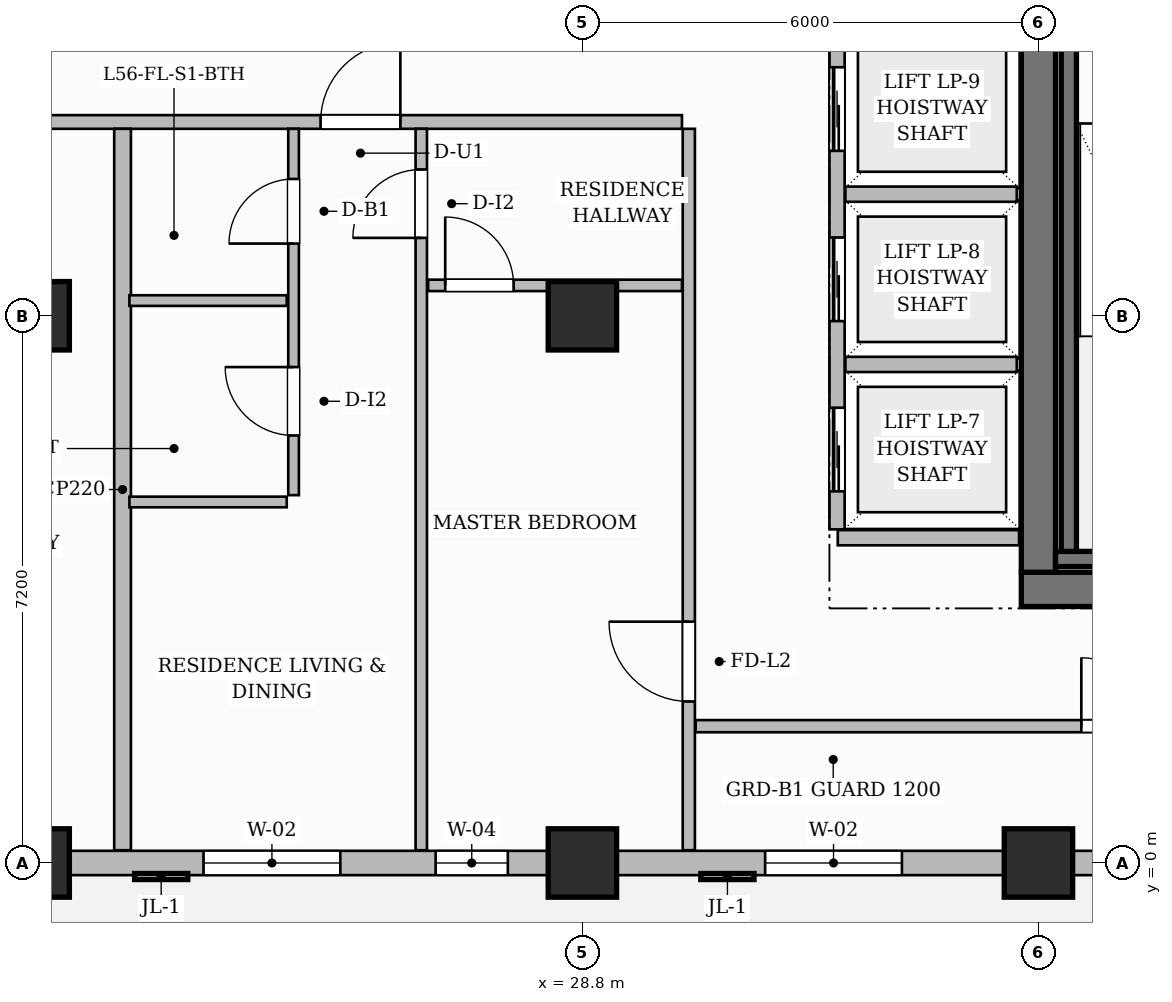
"""IFC4 building model, lengths in metres.
Left out: names, types, materials, properties, quantities, classifications, styles, units other than length and angle.
Written with IfcOpenShell. Run it as: python <this file> out.ifc"""

import sys

from ifc_helpers import new_model, si_unit, direction, frame, frame_2d, origin, origin_2d, place, context, subcontext, project, spatial, rectangle, extrude, source, transform, mapped, element, fill, save


model = new_model("IFC4")
c1 = context("Model", 3, precision=1e-05, world=origin(), true_north=direction((0.0, 1.0)))
c2 = subcontext(c1, "Body", "Model", "MODEL_VIEW")
j1 = project(units=[si_unit("LENGTHUNIT", "METRE"), si_unit("PLANEANGLEUNIT", "RADIAN")], contexts=[c1])
p1 = place(None, origin())
s1 = spatial("IfcSite", under=j1, at=p1, CompositionType="ELEMENT")
p2 = place(p1, origin())
s2 = spatial("IfcBuilding", under=s1, at=p2, CompositionType="ELEMENT")
p3 = place(p2, frame((0.0, 0.0, 225.0)))
s3 = spatial("IfcBuildingStorey", under=s2, at=p3, CompositionType="ELEMENT", Elevation=225.0)
p4 = place(p3, frame((34.575, 3.6, 0.0), z_axis=(0.0, 0.0, 1.0), x_axis=(1.0, 0.0, 0.0)))
e1 = element("IfcWall", 1, at=p4, inside=s3, PredefinedType="SHEAR", context=c2, shape_type="SweptSolid", body=[
    extrude(rectangle(XDim=15.45, YDim=0.45, at=frame_2d((7.725, 0.0))), origin(), (0.0, 0.0, 1.0), 3.85),
])
p5 = place(p4, frame((4.695, 0.0, 0.0)))
e2 = element("IfcOpeningElement", 2, at=p5, cuts=e1, PredefinedType="OPENING", context=c2, shape_type="SweptSolid", body=[
    extrude(rectangle(XDim=0.9, YDim=2.1, at=frame_2d((0.45, 1.05))), frame((0.0, 0.235, 0.0), z_axis=(0.0, -1.0, 0.0), x_axis=(1.0, 0.0, 0.0)), (0.0, 0.0, 1.0), 0.47),
])
p6 = place(p4, frame((7.075, 0.0, 0.0)))
e3 = element("IfcOpeningElement", 3, at=p6, cuts=e1, PredefinedType="OPENING", context=c2, shape_type="SweptSolid", body=[
    extrude(rectangle(XDim=0.9, YDim=2.1, at=frame_2d((0.45, 1.05))), frame((0.0, 0.235, 0.0), z_axis=(0.0, -1.0, 0.0), x_axis=(1.0, 0.0, 0.0)), (0.0, 0.0, 1.0), 0.47),
])
p7 = place(p3, frame((34.8, 3.825, 0.0), z_axis=(0.0, 0.0, 1.0), x_axis=(0.0, 1.0, 0.0)))
e4 = element("IfcWall", 4, at=p7, inside=s3, PredefinedType="SHEAR", context=c2, shape_type="SweptSolid", body=[
    extrude(rectangle(XDim=10.35, YDim=0.45, at=frame_2d((5.175, 0.0))), origin(), (0.0, 0.0, 1.0), 3.85),
])
m1 = source(origin(), c2, "Body", "SweptSolid", [
    extrude(rectangle(XDim=0.9, YDim=0.9, at=origin_2d()), origin(), (0.0, 0.0, 1.0), 3.85),
])
for number, where, z_axis, x_axis in (
    (5, (21.6, 0.0, 0.0), (0.0, 0.0, 1.0), (1.0, 0.0, 0.0)),
    (6, (21.6, 7.2, 0.0), (0.0, 0.0, 1.0), (1.0, 0.0, 0.0)),
    (7, (28.8, 0.0, 0.0), (0.0, 0.0, 1.0), (1.0, 0.0, 0.0)),
    (8, (28.8, 7.2, 0.0), (0.0, 0.0, 1.0), (1.0, 0.0, 0.0)),
    (9, (34.8, 0.0, 0.0), (0.0, 0.0, 1.0), (1.0, 0.0, 0.0)),
):
    element("IfcColumn", number, at=place(p3, frame(where, z_axis=z_axis, x_axis=x_axis)), inside=s3, PredefinedType="COLUMN", context=c2, shape_type="MappedRepresentation", body=[
        mapped(m1, transform((0.0, 0.0, 0.0), scale=1.0)),
    ])
p8 = place(p3, frame((35.025, 4.0, 0.0), z_axis=(0.0, 0.0, 1.0), x_axis=(1.0, 0.0, 0.0)))
e10 = element("IfcWall", 10, at=p8, inside=s3, PredefinedType="SHEAR", context=c2, shape_type="SweptSolid", body=[
    extrude(rectangle(XDim=3.215, YDim=0.2, at=frame_2d((1.607, 0.0))), origin(), (0.0, 0.0, 1.0), 3.85),
])
p9 = place(p3, frame((35.2, 4.1, 0.0), z_axis=(0.0, 0.0, 1.0), x_axis=(0.0, 1.0, 0.0)))
e11 = element("IfcWall", 11, at=p9, inside=s3, PredefinedType="SHEAR", context=c2, shape_type="SweptSolid", body=[
    extrude(rectangle(XDim=6.95, YDim=0.2, at=frame_2d((3.475, 0.0))), origin(), (0.0, 0.0, 1.0), 3.85),
])
p10 = place(p3, frame((32.16, 4.28, 0.0), z_axis=(0.0, 0.0, 1.0), x_axis=(1.0, 0.0, 0.0)))
e12 = element("IfcWall", 12, at=p10, inside=s3, PredefinedType="PARTITIONING", context=c2, shape_type="SweptSolid", body=[
    extrude(rectangle(XDim=2.385, YDim=0.2, at=frame_2d((1.192, 0.0))), origin(), (0.0, 0.0, 1.0), 3.6),
])
p11 = place(p3, frame((32.15, 4.39, 0.0), z_axis=(0.0, 0.0, 1.0), x_axis=(0.0, 1.0, 0.0)))
e13 = element("IfcWall", 13, at=p11, inside=s3, PredefinedType="PARTITIONING", context=c2, shape_type="SweptSolid", body=[
    extrude(rectangle(XDim=8.82, YDim=0.2, at=frame_2d((4.41, 0.0))), origin(), (0.0, 0.0, 1.0), 3.6),
])
p12 = place(p11, frame((0.5, 0.0, 0.0)))
e14 = element("IfcOpeningElement", 14, at=p12, cuts=e13, PredefinedType="OPENING", context=c2, shape_type="SweptSolid", body=[
    extrude(rectangle(XDim=1.1, YDim=2.2, at=frame_2d((0.55, 1.1))), frame((0.0, 0.11, 0.0), z_axis=(0.0, -1.0, 0.0), x_axis=(1.0, 0.0, 0.0)), (0.0, 0.0, 1.0), 0.22),
])
p13 = place(p11, frame((2.74, 0.0, 0.0)))
e15 = element("IfcOpeningElement", 15, at=p13, cuts=e13, PredefinedType="OPENING", context=c2, shape_type="SweptSolid", body=[
    extrude(rectangle(XDim=1.1, YDim=2.2, at=frame_2d((0.55, 1.1))), frame((0.0, 0.11, 0.0), z_axis=(0.0, -1.0, 0.0), x_axis=(1.0, 0.0, 0.0)), (0.0, 0.0, 1.0), 0.22),
])
p14 = place(p11, frame((4.98, 0.0, 0.0)))
e16 = element("IfcOpeningElement", 16, at=p14, cuts=e13, PredefinedType="OPENING", context=c2, shape_type="SweptSolid", body=[
    extrude(rectangle(XDim=1.1, YDim=2.2, at=frame_2d((0.55, 1.1))), frame((0.0, 0.11, 0.0), z_axis=(0.0, -1.0, 0.0), x_axis=(1.0, 0.0, 0.0)), (0.0, 0.0, 1.0), 0.22),
])
p15 = place(p11, frame((7.22, 0.0, 0.0)))
e17 = element("IfcOpeningElement", 17, at=p15, cuts=e13, PredefinedType="OPENING", context=c2, shape_type="SweptSolid", body=[
    extrude(rectangle(XDim=1.1, YDim=2.2, at=frame_2d((0.55, 1.1))), frame((0.0, 0.11, 0.0), z_axis=(0.0, -1.0, 0.0), x_axis=(1.0, 0.0, 0.0)), (0.0, 0.0, 1.0), 0.22),
])
for number, where, z_axis, x_axis in (
    (18, (32.26, 6.56, 0.0), (0.0, 0.0, 1.0), (1.0, 0.0, 0.0)),
    (19, (32.26, 8.8, 0.0), (0.0, 0.0, 1.0), (1.0, 0.0, 0.0)),
):
    element("IfcWall", number, at=place(p3, frame(where, z_axis=z_axis, x_axis=x_axis)), inside=s3, PredefinedType="PARTITIONING", context=c2, shape_type="SweptSolid", body=[
        extrude(rectangle(XDim=2.255, YDim=0.2, at=frame_2d((1.127, 0.0))), origin(), (0.0, 0.0, 1.0), 3.6),
    ])
p16 = place(p3, frame((14.568, 9.75, 0.0), z_axis=(0.0, 0.0, 1.0), x_axis=(1.0, 0.0, 0.0)))
e20 = element("IfcWall", 20, at=p16, inside=s3, PredefinedType="PARTITIONING", context=c2, shape_type="SweptSolid", body=[
    extrude(rectangle(XDim=15.542, YDim=0.18, at=frame_2d((7.771, 0.0))), origin(), (0.0, 0.0, 1.0), 3.6),
])
p17 = place(p16, frame((1.032, 0.0, 0.0)))
e21 = element("IfcOpeningElement", 21, at=p17, cuts=e20, PredefinedType="OPENING", context=c2, shape_type="SweptSolid", body=[
    extrude(rectangle(XDim=1.4, YDim=2.35, at=frame_2d((0.7, 1.175))), frame((0.0, 0.1, 0.0), z_axis=(0.0, -1.0, 0.0), x_axis=(1.0, 0.0, 0.0)), (0.0, 0.0, 1.0), 0.2),
])
p18 = place(p16, frame((5.432, 0.0, 0.0)))
e22 = element("IfcOpeningElement", 22, at=p18, cuts=e20, PredefinedType="OPENING", context=c2, shape_type="SweptSolid", body=[
    extrude(rectangle(XDim=0.95, YDim=2.15, at=frame_2d((0.475, 1.075))), frame((0.0, 0.1, 0.0), z_axis=(0.0, -1.0, 0.0), x_axis=(1.0, 0.0, 0.0)), (0.0, 0.0, 1.0), 0.2),
])
p19 = place(p16, frame((10.787, 0.0, 0.0)))
e23 = element("IfcOpeningElement", 23, at=p19, cuts=e20, PredefinedType="OPENING", context=c2, shape_type="SweptSolid", body=[
    extrude(rectangle(XDim=1.05, YDim=2.25, at=frame_2d((0.525, 1.125))), frame((0.0, 0.1, 0.0), z_axis=(0.0, -1.0, 0.0), x_axis=(1.0, 0.0, 0.0)), (0.0, 0.0, 1.0), 0.2),
])
p20 = place(p3, frame((30.2, 0.168, 0.0), z_axis=(0.0, 0.0, 1.0), x_axis=(0.0, 1.0, 0.0)))
e24 = element("IfcWall", 24, at=p20, inside=s3, PredefinedType="PARTITIONING", context=c2, shape_type="SweptSolid", body=[
    extrude(rectangle(XDim=9.492, YDim=0.16, at=frame_2d((4.746, 0.0))), origin(), (0.0, 0.0, 1.0), 3.6),
])
p21 = place(p20, frame((1.957, 0.0, 0.0)))
e25 = element("IfcOpeningElement", 25, at=p21, cuts=e24, PredefinedType="OPENING", context=c2, shape_type="SweptSolid", body=[
    extrude(rectangle(XDim=1.05, YDim=2.15, at=frame_2d((0.525, 1.075))), frame((0.0, 0.09, 0.0), z_axis=(0.0, -1.0, 0.0), x_axis=(1.0, 0.0, 0.0)), (0.0, 0.0, 1.0), 0.18),
])
p22 = place(p3, frame((30.29, 1.8, 0.0), z_axis=(0.0, 0.0, 1.0), x_axis=(1.0, 0.0, 0.0)))
e26 = element("IfcWall", 26, at=p22, inside=s3, PredefinedType="PARTITIONING", context=c2, shape_type="SweptSolid", body=[
    extrude(rectangle(XDim=19.37, YDim=0.16, at=frame_2d((9.685, 0.0))), origin(), (0.0, 0.0, 1.0), 3.6),
])
p23 = place(p22, frame((5.074, 0.0, 0.0)))
e27 = element("IfcOpeningElement", 27, at=p23, cuts=e26, PredefinedType="OPENING", context=c2, shape_type="SweptSolid", body=[
    extrude(rectangle(XDim=0.9, YDim=2.15, at=frame_2d((0.45, 1.075))), frame((0.0, 0.09, 0.0), z_axis=(0.0, -1.0, 0.0), x_axis=(1.0, 0.0, 0.0)), (0.0, 0.0, 1.0), 0.18),
])
p24 = place(p22, frame((14.06, 0.0, 0.0)))
e28 = element("IfcOpeningElement", 28, at=p24, cuts=e26, PredefinedType="OPENING", context=c2, shape_type="SweptSolid", body=[
    extrude(rectangle(XDim=0.9, YDim=2.15, at=frame_2d((0.45, 1.075))), frame((0.0, 0.09, 0.0), z_axis=(0.0, -1.0, 0.0), x_axis=(1.0, 0.0, 0.0)), (0.0, 0.0, 1.0), 0.18),
])
p25 = place(p3, frame((22.75, 0.168, 0.0), z_axis=(0.0, 0.0, 1.0), x_axis=(0.0, 1.0, 0.0)))
e29 = element("IfcWall", 29, at=p25, inside=s3, PredefinedType="PARTITIONING", context=c2, shape_type="SweptSolid", body=[
    extrude(rectangle(XDim=9.492, YDim=0.22, at=frame_2d((4.746, 0.0))), origin(), (0.0, 0.0, 1.0), 3.6),
])
p26 = place(p3, frame((25.0, 4.84, 0.0), z_axis=(0.0, 0.0, 1.0), x_axis=(0.0, 1.0, 0.0)))
e30 = element("IfcWall", 30, at=p26, inside=s3, PredefinedType="PARTITIONING", context=c2, shape_type="SweptSolid", body=[
    extrude(rectangle(XDim=4.82, YDim=0.14, at=frame_2d((2.41, 0.0))), origin(), (0.0, 0.0, 1.0), 3.315),
])
p27 = place(p26, frame((0.785, 0.0, 0.0)))
e31 = element("IfcOpeningElement", 31, at=p27, cuts=e30, PredefinedType="OPENING", context=c2, shape_type="SweptSolid", body=[
    extrude(rectangle(XDim=0.9, YDim=2.15, at=frame_2d((0.45, 1.075))), frame((0.0, 0.08, 0.0), z_axis=(0.0, -1.0, 0.0), x_axis=(1.0, 0.0, 0.0)), (0.0, 0.0, 1.0), 0.16),
])
p28 = place(p26, frame((3.31, 0.0, 0.0)))
e32 = element("IfcOpeningElement", 32, at=p28, cuts=e30, PredefinedType="OPENING", context=c2, shape_type="SweptSolid", body=[
    extrude(rectangle(XDim=0.85, YDim=2.1, at=frame_2d((0.425, 1.05))), frame((0.0, 0.08, 0.0), z_axis=(0.0, -1.0, 0.0), x_axis=(1.0, 0.0, 0.0)), (0.0, 0.0, 1.0), 0.16),
])
p29 = place(p3, frame((22.84, 7.4, 0.0), z_axis=(0.0, 0.0, 1.0), x_axis=(1.0, 0.0, 0.0)))
e33 = element("IfcWall", 33, at=p29, inside=s3, PredefinedType="PARTITIONING", context=c2, shape_type="SweptSolid", body=[
    extrude(rectangle(XDim=2.07, YDim=0.14, at=frame_2d((1.035, 0.0))), origin(), (0.0, 0.0, 1.0), 3.135),
])
p30 = place(p3, frame((22.84, 4.75, 0.0), z_axis=(0.0, 0.0, 1.0), x_axis=(1.0, 0.0, 0.0)))
e34 = element("IfcWall", 34, at=p30, inside=s3, PredefinedType="PARTITIONING", context=c2, shape_type="SweptSolid", body=[
    extrude(rectangle(XDim=2.07, YDim=0.14, at=frame_2d((1.035, 0.0))), origin(), (0.0, 0.0, 1.0), 3.6),
])
p31 = place(p3, frame((26.68, 0.168, 0.0), z_axis=(0.0, 0.0, 1.0), x_axis=(0.0, 1.0, 0.0)))
e35 = element("IfcWall", 35, at=p31, inside=s3, PredefinedType="PARTITIONING", context=c2, shape_type="SweptSolid", body=[
    extrude(rectangle(XDim=9.492, YDim=0.15, at=frame_2d((4.746, 0.0))), origin(), (0.0, 0.0, 1.0), 3.6),
])
p32 = place(p31, frame((8.057, 0.0, 0.0)))
e36 = element("IfcOpeningElement", 36, at=p32, cuts=e35, PredefinedType="OPENING", context=c2, shape_type="SweptSolid", body=[
    extrude(rectangle(XDim=0.9, YDim=2.15, at=frame_2d((0.45, 1.075))), frame((0.0, 0.085, 0.0), z_axis=(0.0, -1.0, 0.0), x_axis=(1.0, 0.0, 0.0)), (0.0, 0.0, 1.0), 0.17),
])
p33 = place(p3, frame((26.77, 7.6, 0.0), z_axis=(0.0, 0.0, 1.0), x_axis=(1.0, 0.0, 0.0)))
e37 = element("IfcWall", 37, at=p33, inside=s3, PredefinedType="PARTITIONING", context=c2, shape_type="SweptSolid", body=[
    extrude(rectangle(XDim=3.34, YDim=0.15, at=frame_2d((1.67, 0.0))), origin(), (0.0, 0.0, 1.0), 3.6),
])
p34 = place(p33, frame((0.225, 0.0, 0.0)))
e38 = element("IfcOpeningElement", 38, at=p34, cuts=e37, PredefinedType="OPENING", context=c2, shape_type="SweptSolid", body=[
    extrude(rectangle(XDim=0.9, YDim=2.15, at=frame_2d((0.45, 1.075))), frame((0.0, 0.085, 0.0), z_axis=(0.0, -1.0, 0.0), x_axis=(1.0, 0.0, 0.0)), (0.0, 0.0, 1.0), 0.17),
])
p35 = place(p3, frame((14.4, 0.0, 0.0), z_axis=(0.0, 0.0, 1.0), x_axis=(1.0, 0.0, 0.0)))
e39 = element("IfcWall", 39, at=p35, inside=s3, PredefinedType="SOLIDWALL", context=c2, shape_type="SweptSolid", body=[
    extrude(rectangle(XDim=35.4, YDim=0.32, at=frame_2d((17.7, 0.0))), origin(), (0.0, 0.0, 1.0), 3.135),
])
p36 = place(p35, frame((0.85, 0.0, 0.0)))
e40 = element("IfcOpeningElement", 40, at=p36, cuts=e39, PredefinedType="OPENING", context=c2, shape_type="SweptSolid", body=[
    extrude(rectangle(XDim=1.2, YDim=2.2, at=frame_2d((0.6, 1.1))), frame((0.0, 0.17, 0.0), z_axis=(0.0, -1.0, 0.0), x_axis=(1.0, 0.0, 0.0)), (0.0, 0.0, 1.0), 0.34),
])
p37 = place(p35, frame((2.596, 0.0, 0.8)))
e41 = element("IfcOpeningElement", 41, at=p37, cuts=e39, PredefinedType="OPENING", context=c2, shape_type="SweptSolid", body=[
    extrude(rectangle(XDim=0.95, YDim=1.75, at=frame_2d((0.475, 0.875))), frame((0.0, 0.17, 0.0), z_axis=(0.0, -1.0, 0.0), x_axis=(1.0, 0.0, 0.0)), (0.0, 0.0, 1.0), 0.34),
])
p38 = place(p35, frame((4.204, 0.0, 0.8)))
e42 = element("IfcOpeningElement", 42, at=p38, cuts=e39, PredefinedType="OPENING", context=c2, shape_type="SweptSolid", body=[
    extrude(rectangle(XDim=1.8, YDim=1.85, at=frame_2d((0.9, 0.925))), frame((0.0, 0.17, 0.0), z_axis=(0.0, -1.0, 0.0), x_axis=(1.0, 0.0, 0.0)), (0.0, 0.0, 1.0), 0.34),
])
p39 = place(p35, frame((9.415, 0.0, 0.8)))
e43 = element("IfcOpeningElement", 43, at=p39, cuts=e39, PredefinedType="OPENING", context=c2, shape_type="SweptSolid", body=[
    extrude(rectangle(XDim=1.8, YDim=1.85, at=frame_2d((0.9, 0.925))), frame((0.0, 0.17, 0.0), z_axis=(0.0, -1.0, 0.0), x_axis=(1.0, 0.0, 0.0)), (0.0, 0.0, 1.0), 0.34),
])
p40 = place(p35, frame((12.469, 0.0, 0.8)))
e44 = element("IfcOpeningElement", 44, at=p40, cuts=e39, PredefinedType="OPENING", context=c2, shape_type="SweptSolid", body=[
    extrude(rectangle(XDim=0.95, YDim=1.75, at=frame_2d((0.475, 0.875))), frame((0.0, 0.17, 0.0), z_axis=(0.0, -1.0, 0.0), x_axis=(1.0, 0.0, 0.0)), (0.0, 0.0, 1.0), 0.34),
])
p41 = place(p35, frame((16.804, 0.0, 0.8)))
e45 = element("IfcOpeningElement", 45, at=p41, cuts=e39, PredefinedType="OPENING", context=c2, shape_type="SweptSolid", body=[
    extrude(rectangle(XDim=1.8, YDim=1.85, at=frame_2d((0.9, 0.925))), frame((0.0, 0.17, 0.0), z_axis=(0.0, -1.0, 0.0), x_axis=(1.0, 0.0, 0.0)), (0.0, 0.0, 1.0), 0.34),
])
p42 = place(p35, frame((22.396, 0.0, 0.8)))
e46 = element("IfcOpeningElement", 46, at=p42, cuts=e39, PredefinedType="OPENING", context=c2, shape_type="SweptSolid", body=[
    extrude(rectangle(XDim=1.8, YDim=1.85, at=frame_2d((0.9, 0.925))), frame((0.0, 0.17, 0.0), z_axis=(0.0, -1.0, 0.0), x_axis=(1.0, 0.0, 0.0)), (0.0, 0.0, 1.0), 0.34),
])
p43 = place(p35, frame((25.629, 0.0, 0.8)))
e47 = element("IfcOpeningElement", 47, at=p43, cuts=e39, PredefinedType="OPENING", context=c2, shape_type="SweptSolid", body=[
    extrude(rectangle(XDim=0.95, YDim=1.75, at=frame_2d((0.475, 0.875))), frame((0.0, 0.17, 0.0), z_axis=(0.0, -1.0, 0.0), x_axis=(1.0, 0.0, 0.0)), (0.0, 0.0, 1.0), 0.34),
])
p44 = place(p35, frame((29.075, 0.0, 0.8)))
e48 = element("IfcOpeningElement", 48, at=p44, cuts=e39, PredefinedType="OPENING", context=c2, shape_type="SweptSolid", body=[
    extrude(rectangle(XDim=1.8, YDim=1.85, at=frame_2d((0.9, 0.925))), frame((0.0, 0.17, 0.0), z_axis=(0.0, -1.0, 0.0), x_axis=(1.0, 0.0, 0.0)), (0.0, 0.0, 1.0), 0.34),
])
p45 = place(p35, frame((32.125, 0.0, 0.8)))
e49 = element("IfcOpeningElement", 49, at=p45, cuts=e39, PredefinedType="OPENING", context=c2, shape_type="SweptSolid", body=[
    extrude(rectangle(XDim=1.8, YDim=1.85, at=frame_2d((0.9, 0.925))), frame((0.0, 0.17, 0.0), z_axis=(0.0, -1.0, 0.0), x_axis=(1.0, 0.0, 0.0)), (0.0, 0.0, 1.0), 0.34),
])
m2 = source(origin(), c2, "Body", "SweptSolid", [
    extrude(rectangle(XDim=1.05, YDim=2.15, at=frame_2d((0.525, 1.075))), frame((0.0, 0.025, 0.0), z_axis=(0.0, -1.0, 0.0), x_axis=(1.0, 0.0, 0.0)), (0.0, 0.0, 1.0), 0.05),
])
p46 = place(p21, origin())
e50 = element("IfcDoor", 50, at=p46, inside=s3, OperationType="SINGLE_SWING_RIGHT", PredefinedType="DOOR", context=c2, shape_type="MappedRepresentation", body=[
    mapped(m2, transform((0.0, 0.0, 0.0), scale=1.0)),
])
fill(e25, e50)
m3 = source(origin(), c2, "Body", "SweptSolid", [
    extrude(rectangle(XDim=0.9, YDim=2.15, at=frame_2d((0.45, 1.075))), frame((0.0, 0.025, 0.0), z_axis=(0.0, -1.0, 0.0), x_axis=(1.0, 0.0, 0.0)), (0.0, 0.0, 1.0), 0.05),
])
p47 = place(p23, origin())
e51 = element("IfcDoor", 51, at=p47, inside=s3, OperationType="SINGLE_SWING_LEFT", PredefinedType="DOOR", context=c2, shape_type="MappedRepresentation", body=[
    mapped(m3, transform((0.0, 0.0, 0.0), scale=1.0)),
])
fill(e27, e51)
p48 = place(p27, origin())
e52 = element("IfcDoor", 52, at=p48, inside=s3, OperationType="SINGLE_SWING_RIGHT", PredefinedType="DOOR", context=c2, shape_type="MappedRepresentation", body=[
    mapped(m3, transform((0.0, 0.0, 0.0), scale=1.0)),
])
fill(e31, e52)
m4 = source(origin(), c2, "Body", "SweptSolid", [
    extrude(rectangle(XDim=0.85, YDim=2.1, at=frame_2d((0.425, 1.05))), frame((0.0, 0.025, 0.0), z_axis=(0.0, -1.0, 0.0), x_axis=(1.0, 0.0, 0.0)), (0.0, 0.0, 1.0), 0.05),
])
p49 = place(p28, origin())
e53 = element("IfcDoor", 53, at=p49, inside=s3, OperationType="SINGLE_SWING_LEFT", PredefinedType="DOOR", context=c2, shape_type="MappedRepresentation", body=[
    mapped(m4, transform((0.0, 0.0, 0.0), scale=1.0)),
])
fill(e32, e53)
m5 = source(origin(), c2, "Body", "SweptSolid", [
    extrude(rectangle(XDim=1.05, YDim=2.25, at=frame_2d((0.525, 1.125))), frame((0.0, 0.025, 0.0), z_axis=(0.0, -1.0, 0.0), x_axis=(1.0, 0.0, 0.0)), (0.0, 0.0, 1.0), 0.05),
])
p50 = place(p19, origin())
e54 = element("IfcDoor", 54, at=p50, inside=s3, OperationType="SINGLE_SWING_RIGHT", PredefinedType="DOOR", context=c2, shape_type="MappedRepresentation", body=[
    mapped(m5, transform((0.0, 0.0, 0.0), scale=1.0)),
])
fill(e23, e54)
p51 = place(p32, origin())
e55 = element("IfcDoor", 55, at=p51, inside=s3, OperationType="SINGLE_SWING_LEFT", PredefinedType="DOOR", context=c2, shape_type="MappedRepresentation", body=[
    mapped(m3, transform((0.0, 0.0, 0.0), scale=1.0)),
])
fill(e36, e55)
p52 = place(p34, origin())
e56 = element("IfcDoor", 56, at=p52, inside=s3, OperationType="SINGLE_SWING_LEFT", PredefinedType="DOOR", context=c2, shape_type="MappedRepresentation", body=[
    mapped(m3, transform((0.0, 0.0, 0.0), scale=1.0)),
])
fill(e38, e56)
m6 = source(origin(), c2, "Body", "SweptSolid", [
    extrude(rectangle(XDim=1.1, YDim=2.2, at=frame_2d((0.55, 1.1))), frame((0.0, 0.025, 0.0), z_axis=(0.0, -1.0, 0.0), x_axis=(1.0, 0.0, 0.0)), (0.0, 0.0, 1.0), 0.05),
])
p53 = place(p12, origin())
e57 = element("IfcDoor", 57, at=p53, inside=s3, OperationType="SLIDING_TO_LEFT", PredefinedType="DOOR", context=c2, shape_type="MappedRepresentation", body=[
    mapped(m6, transform((0.0, 0.0, 0.0), scale=1.0)),
])
fill(e14, e57)
p54 = place(p13, origin())
e58 = element("IfcDoor", 58, at=p54, inside=s3, OperationType="SLIDING_TO_LEFT", PredefinedType="DOOR", context=c2, shape_type="MappedRepresentation", body=[
    mapped(m6, transform((0.0, 0.0, 0.0), scale=1.0)),
])
fill(e15, e58)
p55 = place(p14, origin())
e59 = element("IfcDoor", 59, at=p55, inside=s3, OperationType="SLIDING_TO_LEFT", PredefinedType="DOOR", context=c2, shape_type="MappedRepresentation", body=[
    mapped(m6, transform((0.0, 0.0, 0.0), scale=1.0)),
])
fill(e16, e59)
m7 = source(origin(), c2, "Body", "SweptSolid", [
    extrude(rectangle(XDim=1.8, YDim=1.85, at=frame_2d((0.9, 0.925))), frame((0.0, 0.03, 0.0), z_axis=(0.0, -1.0, 0.0), x_axis=(1.0, 0.0, 0.0)), (0.0, 0.0, 1.0), 0.06),
])
p56 = place(p39, origin())
e60 = element("IfcWindow", 60, at=p56, inside=s3, PartitioningType="DOUBLE_PANEL_VERTICAL", PredefinedType="WINDOW", context=c2, shape_type="MappedRepresentation", body=[
    mapped(m7, transform((0.0, 0.0, 0.0), scale=1.0)),
])
fill(e43, e60)
m8 = source(origin(), c2, "Body", "SweptSolid", [
    extrude(rectangle(XDim=0.95, YDim=1.75, at=frame_2d((0.475, 0.875))), frame((0.0, 0.03, 0.0), z_axis=(0.0, -1.0, 0.0), x_axis=(1.0, 0.0, 0.0)), (0.0, 0.0, 1.0), 0.06),
])
p57 = place(p40, origin())
e61 = element("IfcWindow", 61, at=p57, inside=s3, PartitioningType="SINGLE_PANEL", PredefinedType="WINDOW", context=c2, shape_type="MappedRepresentation", body=[
    mapped(m8, transform((0.0, 0.0, 0.0), scale=1.0)),
])
fill(e44, e61)
p58 = place(p41, origin())
e62 = element("IfcWindow", 62, at=p58, inside=s3, PartitioningType="DOUBLE_PANEL_VERTICAL", PredefinedType="WINDOW", context=c2, shape_type="MappedRepresentation", body=[
    mapped(m7, transform((0.0, 0.0, 0.0), scale=1.0)),
])
fill(e45, e62)
save(model, sys.argv[1])
